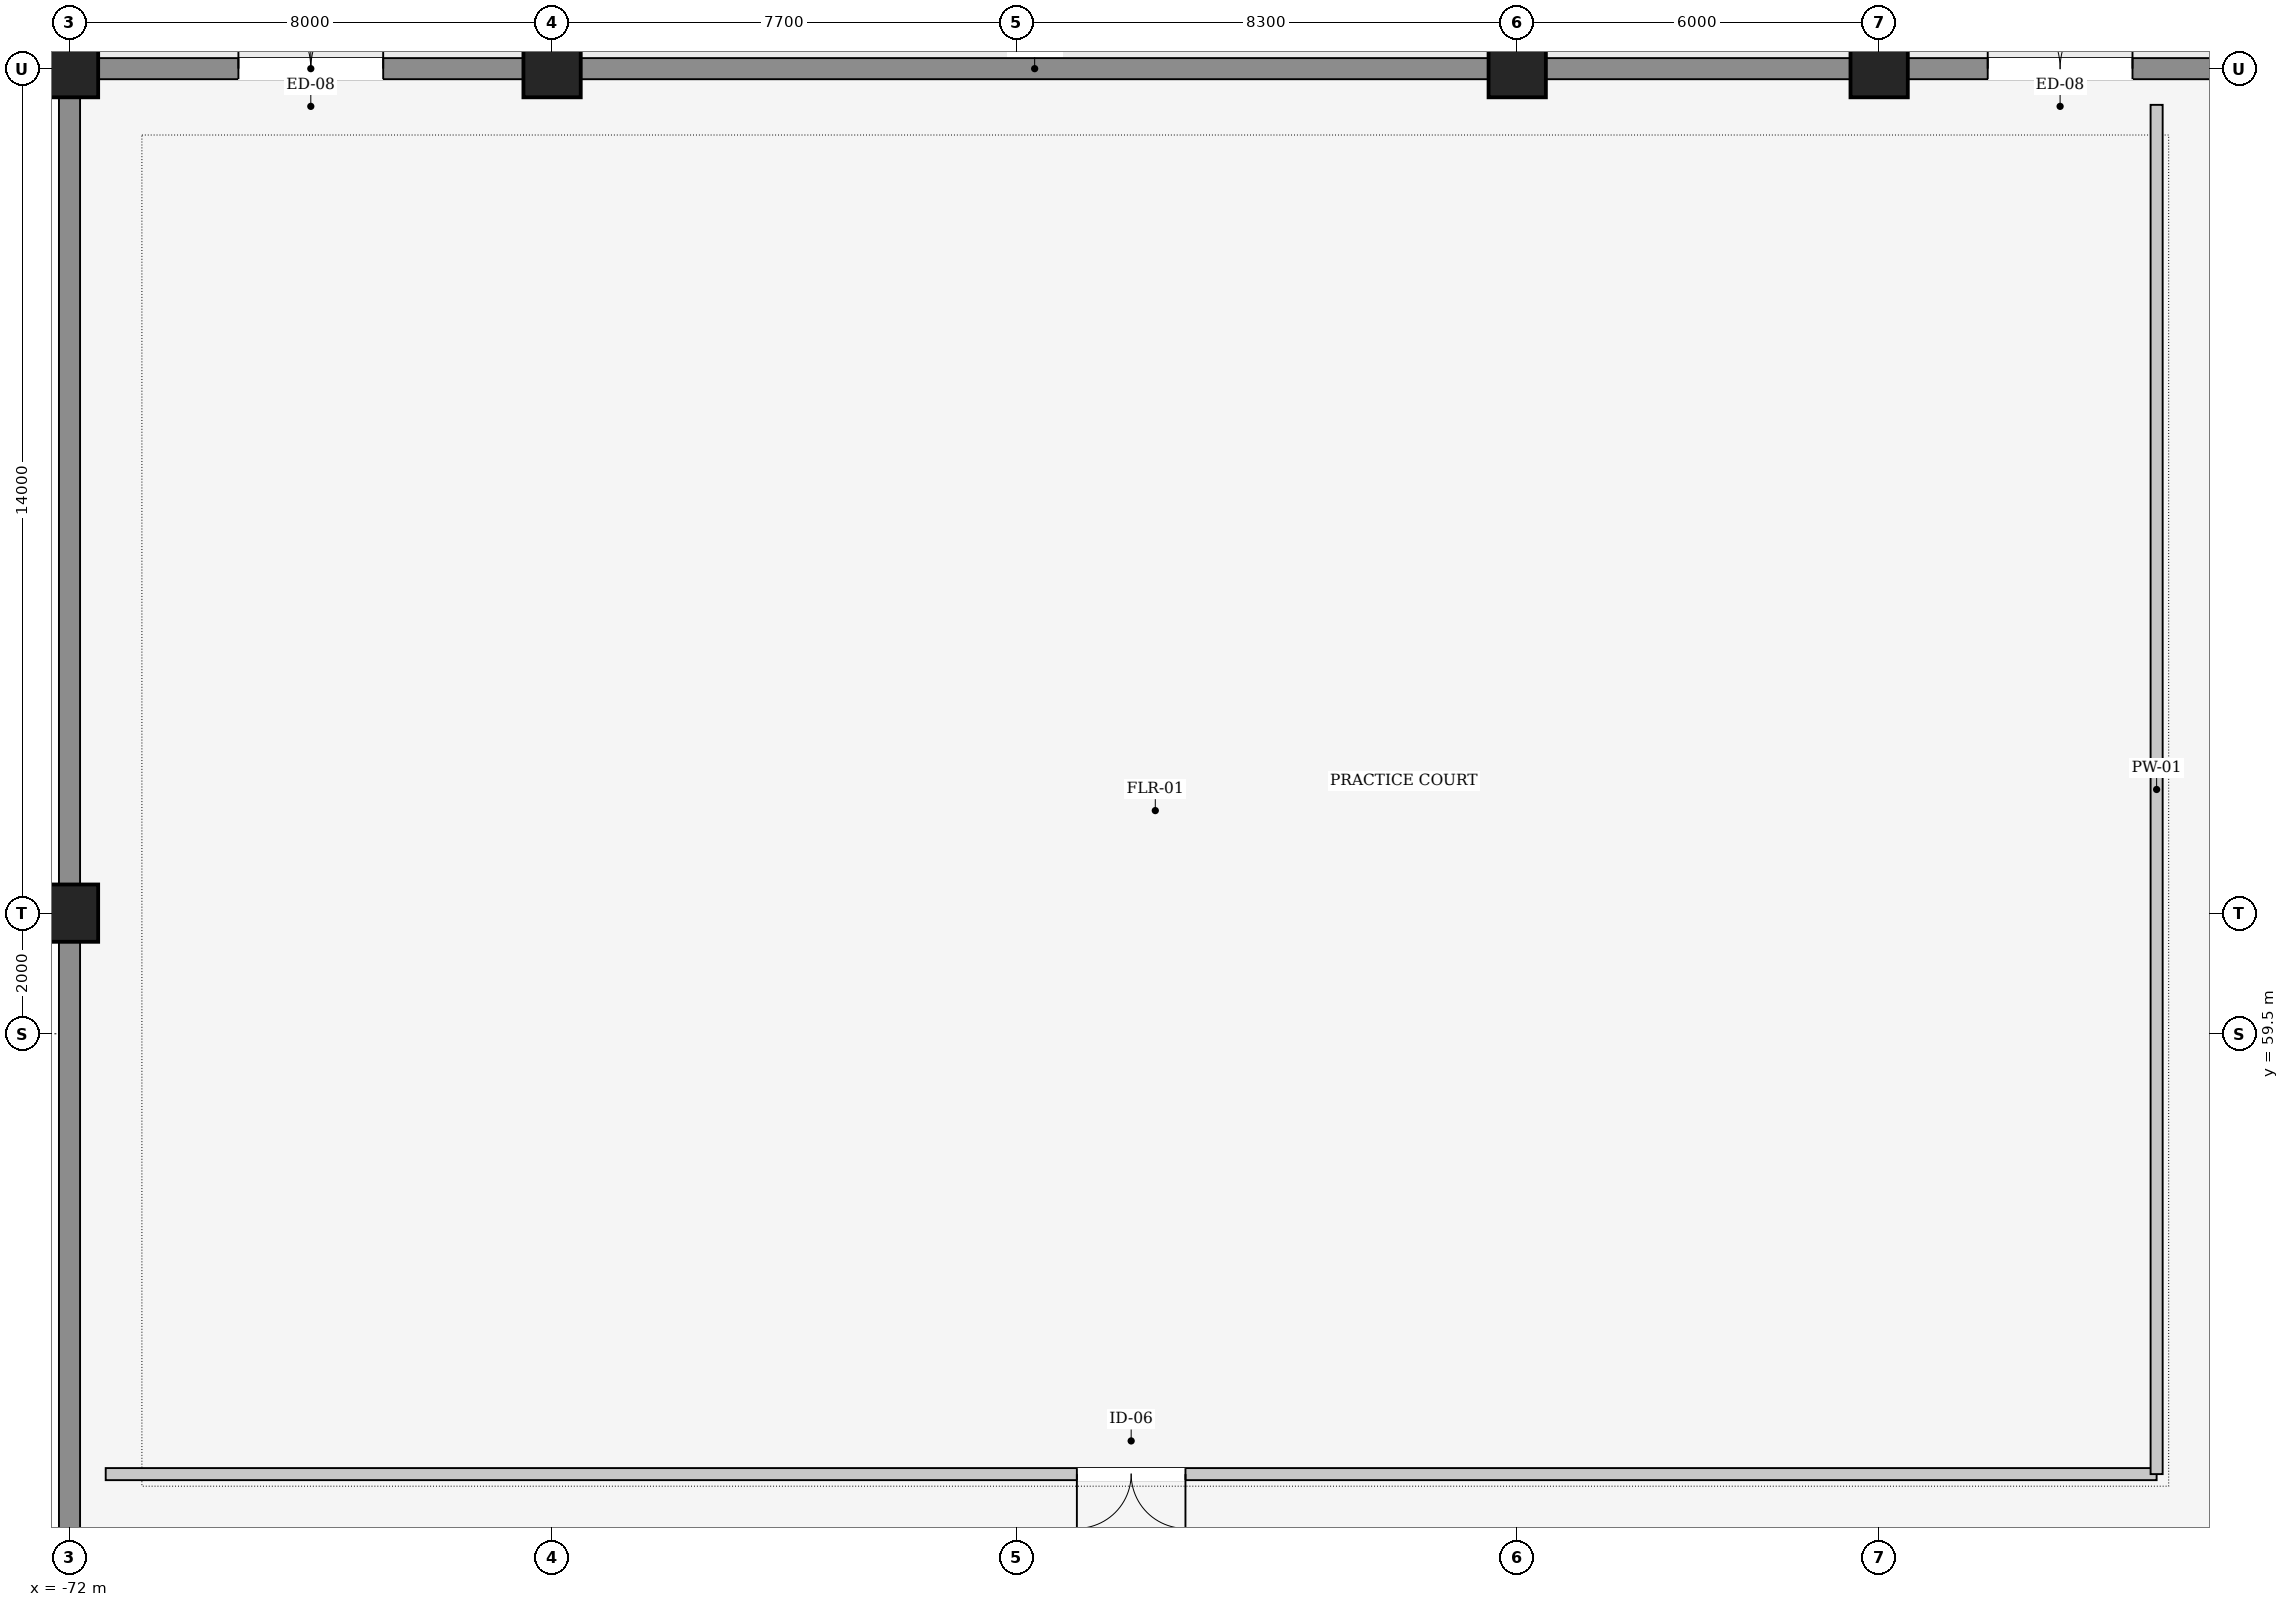
"""IFC4 building model, lengths in metres.
Left out: names, types, materials, properties, quantities, classifications, styles, units other than length and angle.
Written with IfcOpenShell. Run it as: python <this file> out.ifc"""

import sys

from ifc_helpers import new_model, si_unit, direction, frame, frame_2d, origin, origin_2d, place, context, subcontext, project, spatial, rectangle, extrude, element, fill, save


model = new_model("IFC4")
c1 = context("Model", 3, precision=1e-05, world=origin(), true_north=direction((0.0, 1.0)))
c2 = subcontext(c1, "Body", "Model", "MODEL_VIEW")
j1 = project(units=[si_unit("LENGTHUNIT", "METRE"), si_unit("PLANEANGLEUNIT", "RADIAN")], contexts=[c1])
p1 = place(None, origin())
s1 = spatial("IfcSite", under=j1, at=p1, CompositionType="ELEMENT")
p2 = place(p1, origin())
s2 = spatial("IfcBuilding", under=s1, at=p2, CompositionType="ELEMENT")
p3 = place(p2, origin())
s3 = spatial("IfcBuildingStorey", under=s2, at=p3, CompositionType="ELEMENT", Elevation=0.0)
for number, where, z_axis, x_axis in (
    (1, (-72.0, 61.5, 0.0), (0.0, 0.0, 1.0), (1.0, 0.0, 0.0)),
    (2, (-72.0, 75.5, 0.0), (0.0, 0.0, 1.0), (1.0, 0.0, 0.0)),
    (3, (-64.0, 75.5, 0.0), (0.0, 0.0, 1.0), (1.0, 0.0, 0.0)),
    (4, (-48.0, 75.5, 0.0), (0.0, 0.0, 1.0), (1.0, 0.0, 0.0)),
    (5, (-42.0, 75.5, 0.0), (0.0, 0.0, 1.0), (1.0, 0.0, 0.0)),
):
    element("IfcColumn", number, at=place(p3, frame(where, z_axis=z_axis, x_axis=x_axis)), inside=s3, PredefinedType="COLUMN", context=c2, shape_type="SweptSolid", body=[
        extrude(rectangle(XDim=0.95, YDim=0.95, at=origin_2d()), origin(), (0.0, 0.0, 1.0), 6.0),
    ])
p4 = place(p3, frame((-71.543, 75.5, 0.0), z_axis=(0.0, 0.0, 1.0), x_axis=(1.0, 0.0, 0.0)))
e6 = element("IfcWall", 6, at=p4, inside=s3, PredefinedType="SOLIDWALL", context=c2, shape_type="SweptSolid", body=[
    extrude(rectangle(XDim=7.086, YDim=0.35, at=frame_2d((3.543, 0.0))), origin(), (0.0, 0.0, 1.0), 4.94),
])
p5 = place(p4, frame((2.343, 0.0, 0.0)))
e7 = element("IfcOpeningElement", 7, at=p5, cuts=e6, PredefinedType="OPENING", context=c2, shape_type="SweptSolid", body=[
    extrude(rectangle(XDim=2.4, YDim=2.6, at=frame_2d((1.2, 1.3))), frame((0.0, 0.185, 0.0), z_axis=(0.0, -1.0, 0.0), x_axis=(1.0, 0.0, 0.0)), (0.0, 0.0, 1.0), 0.37),
])
p6 = place(p3, frame((-63.543, 75.5, 0.0), z_axis=(0.0, 0.0, 1.0), x_axis=(1.0, 0.0, 0.0)))
e8 = element("IfcWall", 8, at=p6, inside=s3, PredefinedType="SOLIDWALL", context=c2, shape_type="SweptSolid", body=[
    extrude(rectangle(XDim=15.086, YDim=0.35, at=frame_2d((7.543, 0.0))), origin(), (0.0, 0.0, 1.0), 4.74),
])
p7 = place(p3, frame((-47.543, 75.5, 0.0), z_axis=(0.0, 0.0, 1.0), x_axis=(1.0, 0.0, 0.0)))
e9 = element("IfcWall", 9, at=p7, inside=s3, PredefinedType="SOLIDWALL", context=c2, shape_type="SweptSolid", body=[
    extrude(rectangle(XDim=5.086, YDim=0.35, at=frame_2d((2.543, 0.0))), origin(), (0.0, 0.0, 1.0), 4.94),
])
p8 = place(p3, frame((-41.543, 75.5, 0.0), z_axis=(0.0, 0.0, 1.0), x_axis=(1.0, 0.0, 0.0)))
e10 = element("IfcWall", 10, at=p8, inside=s3, PredefinedType="SOLIDWALL", context=c2, shape_type="SweptSolid", body=[
    extrude(rectangle(XDim=5.086, YDim=0.35, at=frame_2d((2.543, 0.0))), origin(), (0.0, 0.0, 1.0), 4.94),
])
p9 = place(p8, frame((1.343, 0.0, 0.0)))
e11 = element("IfcOpeningElement", 11, at=p9, cuts=e10, PredefinedType="OPENING", context=c2, shape_type="SweptSolid", body=[
    extrude(rectangle(XDim=2.4, YDim=2.6, at=frame_2d((1.2, 1.3))), frame((0.0, 0.185, 0.0), z_axis=(0.0, -1.0, 0.0), x_axis=(1.0, 0.0, 0.0)), (0.0, 0.0, 1.0), 0.37),
])
p10 = place(p3, frame((-72.0, 48.757, 0.0), z_axis=(0.0, 0.0, 1.0), x_axis=(0.0, 1.0, 0.0)))
e12 = element("IfcWall", 12, at=p10, inside=s3, PredefinedType="SOLIDWALL", context=c2, shape_type="SweptSolid", body=[
    extrude(rectangle(XDim=12.286, YDim=0.35, at=frame_2d((6.143, 0.0))), origin(), (0.0, 0.0, 1.0), 5.157),
])
p11 = place(p3, frame((-72.0, 61.957, 0.0), z_axis=(0.0, 0.0, 1.0), x_axis=(0.0, 1.0, 0.0)))
e13 = element("IfcWall", 13, at=p11, inside=s3, PredefinedType="SOLIDWALL", context=c2, shape_type="SweptSolid", body=[
    extrude(rectangle(XDim=13.086, YDim=0.35, at=frame_2d((6.543, 0.0))), origin(), (0.0, 0.0, 1.0), 5.157),
])
p12 = place(p3, frame((-37.4, 52.2, 0.0), z_axis=(0.0, 0.0, 1.0), x_axis=(-1.0, 0.0, 0.0)))
e14 = element("IfcWall", 14, at=p12, inside=s3, PredefinedType="PARTITIONING", context=c2, shape_type="SweptSolid", body=[
    extrude(rectangle(XDim=34.0, YDim=0.2, at=frame_2d((17.0, 0.0))), origin(), (0.0, 0.0, 1.0), 5.64),
])
p13 = place(p12, frame((16.1, 0.0, 0.0)))
e15 = element("IfcOpeningElement", 15, at=p13, cuts=e14, PredefinedType="OPENING", context=c2, shape_type="SweptSolid", body=[
    extrude(rectangle(XDim=1.8, YDim=2.2, at=frame_2d((0.9, 1.1))), frame((0.0, 0.11, 0.0), z_axis=(0.0, -1.0, 0.0), x_axis=(1.0, 0.0, 0.0)), (0.0, 0.0, 1.0), 0.22),
])
p14 = place(p3, frame((-37.4, 74.9, 0.0), z_axis=(0.0, 0.0, 1.0), x_axis=(0.0, -1.0, 0.0)))
e16 = element("IfcWall", 16, at=p14, inside=s3, PredefinedType="PARTITIONING", context=c2, shape_type="SweptSolid", body=[
    extrude(rectangle(XDim=22.7, YDim=0.2, at=frame_2d((11.35, 0.0))), origin(), (0.0, 0.0, 1.0), 5.64),
])
p15 = place(p5, origin())
e17 = element("IfcDoor", 17, at=p15, inside=s3, OperationType="DOUBLE_DOOR_SINGLE_SWING", PredefinedType="DOOR", context=c2, shape_type="SweptSolid", body=[
    extrude(rectangle(XDim=2.4, YDim=2.6, at=frame_2d((1.2, 1.3))), frame((0.0, 0.025, 0.0), z_axis=(0.0, -1.0, 0.0), x_axis=(1.0, 0.0, 0.0)), (0.0, 0.0, 1.0), 0.05),
])
fill(e7, e17)
p16 = place(p9, origin())
e18 = element("IfcDoor", 18, at=p16, inside=s3, OperationType="DOUBLE_DOOR_SINGLE_SWING", PredefinedType="DOOR", context=c2, shape_type="SweptSolid", body=[
    extrude(rectangle(XDim=2.4, YDim=2.6, at=frame_2d((1.2, 1.3))), frame((0.0, 0.025, 0.0), z_axis=(0.0, -1.0, 0.0), x_axis=(1.0, 0.0, 0.0)), (0.0, 0.0, 1.0), 0.05),
])
fill(e11, e18)
p17 = place(p13, origin())
e19 = element("IfcDoor", 19, at=p17, inside=s3, OperationType="DOUBLE_DOOR_SINGLE_SWING", PredefinedType="DOOR", context=c2, shape_type="SweptSolid", body=[
    extrude(rectangle(XDim=1.8, YDim=2.2, at=frame_2d((0.9, 1.1))), frame((0.0, 0.025, 0.0), z_axis=(0.0, -1.0, 0.0), x_axis=(1.0, 0.0, 0.0)), (0.0, 0.0, 1.0), 0.05),
])
fill(e15, e19)
save(model, sys.argv[1])
